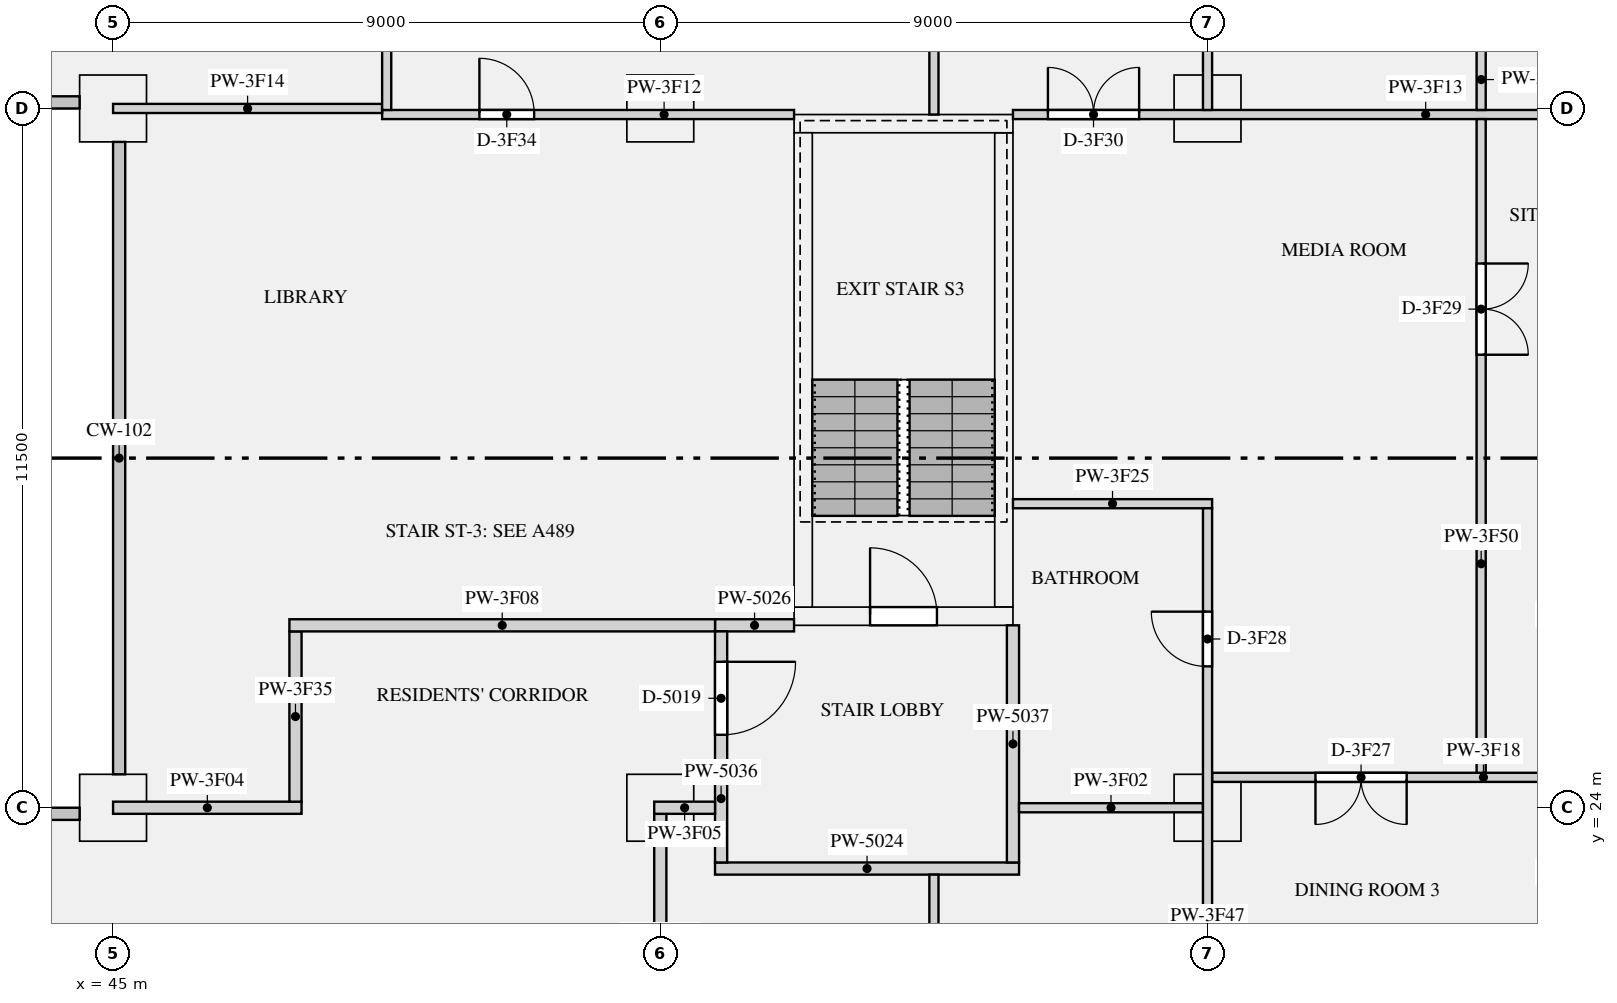
"""IFC4 building model, lengths in metres.
Left out: names, types, materials, properties, quantities, classifications, styles, units other than length and angle.
Written with IfcOpenShell. Run it as: python <this file> out.ifc"""

import sys

from ifc_helpers import new_model, si_unit, direction, frame, frame_2d, origin, origin_2d, place, context, subcontext, project, spatial, rectangle, extrude, element, fill, save


model = new_model("IFC4")
c1 = context("Model", 3, precision=1e-05, world=origin(), true_north=direction((0.0, 1.0)))
c2 = subcontext(c1, "Body", "Model", "MODEL_VIEW")
j1 = project(units=[si_unit("LENGTHUNIT", "METRE"), si_unit("PLANEANGLEUNIT", "RADIAN")], contexts=[c1])
p1 = place(None, origin())
s1 = spatial("IfcSite", under=j1, at=p1, CompositionType="ELEMENT")
p2 = place(p1, origin())
s2 = spatial("IfcBuilding", under=s1, at=p2, CompositionType="ELEMENT")
p3 = place(p2, frame((0.0, 0.0, 182.25)))
s3 = spatial("IfcBuildingStorey", under=s2, at=p3, CompositionType="ELEMENT", Elevation=182.25)
for number, where, z_axis, x_axis in (
    (1, (45.0, 24.0, 0.0), (0.0, 0.0, 1.0), (1.0, 0.0, 0.0)),
    (2, (54.0, 24.0, 0.0), (0.0, 0.0, 1.0), (1.0, 0.0, 0.0)),
    (3, (63.0, 24.0, 0.0), (0.0, 0.0, 1.0), (1.0, 0.0, 0.0)),
    (4, (45.0, 35.5, 0.0), (0.0, 0.0, 1.0), (1.0, 0.0, 0.0)),
    (5, (54.0, 35.5, 0.0), (0.0, 0.0, 1.0), (1.0, 0.0, 0.0)),
    (6, (63.0, 35.5, 0.0), (0.0, 0.0, 1.0), (1.0, 0.0, 0.0)),
):
    element("IfcColumn", number, at=place(p3, frame(where, z_axis=z_axis, x_axis=x_axis)), inside=s3, PredefinedType="COLUMN", context=c2, shape_type="SweptSolid", body=[
        extrude(rectangle(XDim=1.1, YDim=1.1, at=origin_2d()), origin(), (0.0, 0.0, 1.0), 3.15),
    ])
p4 = place(p3, frame((56.2, 27.15, 0.0), z_axis=(0.0, 0.0, 1.0), x_axis=(1.0, 0.0, 0.0)))
e7 = element("IfcWall", 7, at=p4, inside=s3, PredefinedType="SHEAR", context=c2, shape_type="SweptSolid", body=[
    extrude(rectangle(XDim=3.6, YDim=0.3, at=frame_2d((1.8, 0.0))), origin(), (0.0, 0.0, 1.0), 3.15),
])
p5 = place(p4, frame((1.25, 0.0, 0.0)))
e8 = element("IfcOpeningElement", 8, at=p5, cuts=e7, PredefinedType="OPENING", context=c2, shape_type="SweptSolid", body=[
    extrude(rectangle(XDim=1.1, YDim=2.1, at=frame_2d((0.55, 1.05))), frame((0.0, 0.16, 0.0), z_axis=(0.0, -1.0, 0.0), x_axis=(1.0, 0.0, 0.0)), (0.0, 0.0, 1.0), 0.32),
])
p6 = place(p3, frame((56.2, 35.25, 0.0), z_axis=(0.0, 0.0, 1.0), x_axis=(1.0, 0.0, 0.0)))
e9 = element("IfcWall", 9, at=p6, inside=s3, PredefinedType="SHEAR", context=c2, shape_type="SweptSolid", body=[
    extrude(rectangle(XDim=3.6, YDim=0.3, at=frame_2d((1.8, 0.0))), origin(), (0.0, 0.0, 1.0), 3.15),
])
for number, where, z_axis, x_axis in (
    (10, (56.35, 27.3, 0.0), (0.0, 0.0, 1.0), (0.0, 1.0, 0.0)),
    (11, (59.65, 27.3, 0.0), (0.0, 0.0, 1.0), (0.0, 1.0, 0.0)),
):
    element("IfcWall", number, at=place(p3, frame(where, z_axis=z_axis, x_axis=x_axis)), inside=s3, PredefinedType="SHEAR", context=c2, shape_type="SweptSolid", body=[
        extrude(rectangle(XDim=7.8, YDim=0.3, at=frame_2d((3.9, 0.0))), origin(), (0.0, 0.0, 1.0), 3.15),
    ])
p7 = place(p3, frame((54.9, 23.0, 0.0), z_axis=(0.0, 0.0, 1.0), x_axis=(1.0, 0.0, 0.0)))
e12 = element("IfcWall", 12, at=p7, inside=s3, PredefinedType="PARTITIONING", context=c2, shape_type="SweptSolid", body=[
    extrude(rectangle(XDim=5.0, YDim=0.2, at=frame_2d((2.5, 0.0))), origin(), (0.0, 0.0, 1.0), 2.65),
])
p8 = place(p3, frame((54.9, 27.0, 0.0), z_axis=(0.0, 0.0, 1.0), x_axis=(1.0, 0.0, 0.0)))
e13 = element("IfcWall", 13, at=p8, inside=s3, PredefinedType="PARTITIONING", context=c2, shape_type="SweptSolid", body=[
    extrude(rectangle(XDim=1.3, YDim=0.2, at=frame_2d((0.65, 0.0))), origin(), (0.0, 0.0, 1.0), 2.65),
])
p9 = place(p3, frame((55.0, 23.1, 0.0), z_axis=(0.0, 0.0, 1.0), x_axis=(0.0, 1.0, 0.0)))
e14 = element("IfcWall", 14, at=p9, inside=s3, PredefinedType="PARTITIONING", context=c2, shape_type="SweptSolid", body=[
    extrude(rectangle(XDim=3.8, YDim=0.2, at=frame_2d((1.9, 0.0))), origin(), (0.0, 0.0, 1.0), 2.65),
])
p10 = place(p9, frame((2.1, 0.0, 0.0)))
e15 = element("IfcOpeningElement", 15, at=p10, cuts=e14, PredefinedType="OPENING", context=c2, shape_type="SweptSolid", body=[
    extrude(rectangle(XDim=1.2, YDim=2.1, at=frame_2d((0.6, 1.05))), frame((0.0, 0.11, 0.0), z_axis=(0.0, -1.0, 0.0), x_axis=(1.0, 0.0, 0.0)), (0.0, 0.0, 1.0), 0.22),
])
p11 = place(p3, frame((59.8, 23.1, 0.0), z_axis=(0.0, 0.0, 1.0), x_axis=(0.0, 1.0, 0.0)))
e16 = element("IfcWall", 16, at=p11, inside=s3, PredefinedType="PARTITIONING", context=c2, shape_type="SweptSolid", body=[
    extrude(rectangle(XDim=3.9, YDim=0.2, at=frame_2d((1.95, 0.0))), origin(), (0.0, 0.0, 1.0), 2.65),
])
p12 = place(p3, frame((59.9, 24.0, 0.0), z_axis=(0.0, 0.0, 1.0), x_axis=(1.0, 0.0, 0.0)))
e17 = element("IfcWall", 17, at=p12, inside=s3, PredefinedType="PARTITIONING", context=c2, shape_type="SweptSolid", body=[
    extrude(rectangle(XDim=3.025, YDim=0.15, at=frame_2d((1.513, 0.0))), origin(), (0.0, 0.0, 1.0), 2.65),
])
p13 = place(p3, frame((45.0, 24.0, 0.0), z_axis=(0.0, 0.0, 1.0), x_axis=(1.0, 0.0, 0.0)))
e18 = element("IfcWall", 18, at=p13, inside=s3, PredefinedType="PARTITIONING", context=c2, shape_type="SweptSolid", body=[
    extrude(rectangle(XDim=3.1, YDim=0.2, at=frame_2d((1.55, 0.0))), origin(), (0.0, 0.0, 1.0), 2.65),
])
p14 = place(p3, frame((53.9, 24.0, 0.0), z_axis=(0.0, 0.0, 1.0), x_axis=(1.0, 0.0, 0.0)))
e19 = element("IfcWall", 19, at=p14, inside=s3, PredefinedType="PARTITIONING", context=c2, shape_type="SweptSolid", body=[
    extrude(rectangle(XDim=1.0, YDim=0.2, at=frame_2d((0.5, 0.0))), origin(), (0.0, 0.0, 1.0), 2.65),
])
p15 = place(p3, frame((47.9, 27.0, 0.0), z_axis=(0.0, 0.0, 1.0), x_axis=(1.0, 0.0, 0.0)))
e20 = element("IfcWall", 20, at=p15, inside=s3, PredefinedType="PARTITIONING", context=c2, shape_type="SweptSolid", body=[
    extrude(rectangle(XDim=7.0, YDim=0.2, at=frame_2d((3.5, 0.0))), origin(), (0.0, 0.0, 1.0), 2.65),
])
p16 = place(p3, frame((49.425, 35.4, 0.0), z_axis=(0.0, 0.0, 1.0), x_axis=(1.0, 0.0, 0.0)))
e21 = element("IfcWall", 21, at=p16, inside=s3, PredefinedType="PARTITIONING", context=c2, shape_type="SweptSolid", body=[
    extrude(rectangle(XDim=6.775, YDim=0.15, at=frame_2d((3.387, 0.0))), origin(), (0.0, 0.0, 1.0), 2.65),
])
p17 = place(p16, frame((1.6, 0.0, 0.0)))
e22 = element("IfcOpeningElement", 22, at=p17, cuts=e21, PredefinedType="OPENING", context=c2, shape_type="SweptSolid", body=[
    extrude(rectangle(XDim=0.9, YDim=2.1, at=frame_2d((0.45, 1.05))), frame((0.0, 0.085, 0.0), z_axis=(0.0, -1.0, 0.0), x_axis=(1.0, 0.0, 0.0)), (0.0, 0.0, 1.0), 0.17),
])
p18 = place(p3, frame((59.8, 35.4, 0.0), z_axis=(0.0, 0.0, 1.0), x_axis=(1.0, 0.0, 0.0)))
e23 = element("IfcWall", 23, at=p18, inside=s3, PredefinedType="PARTITIONING", context=c2, shape_type="SweptSolid", body=[
    extrude(rectangle(XDim=11.5, YDim=0.15, at=frame_2d((5.75, 0.0))), origin(), (0.0, 0.0, 1.0), 2.65),
])
p19 = place(p18, frame((0.575, 0.0, 0.0)))
e24 = element("IfcOpeningElement", 24, at=p19, cuts=e23, PredefinedType="OPENING", context=c2, shape_type="SweptSolid", body=[
    extrude(rectangle(XDim=1.5, YDim=2.1, at=frame_2d((0.75, 1.05))), frame((0.0, 0.085, 0.0), z_axis=(0.0, -1.0, 0.0), x_axis=(1.0, 0.0, 0.0)), (0.0, 0.0, 1.0), 0.17),
])
p20 = place(p3, frame((45.0, 35.5, 0.0), z_axis=(0.0, 0.0, 1.0), x_axis=(1.0, 0.0, 0.0)))
e25 = element("IfcWall", 25, at=p20, inside=s3, PredefinedType="PARTITIONING", context=c2, shape_type="SweptSolid", body=[
    extrude(rectangle(XDim=4.425, YDim=0.15, at=frame_2d((2.212, 0.0))), origin(), (0.0, 0.0, 1.0), 2.65),
])
p21 = place(p3, frame((63.075, 24.5, 0.0), z_axis=(0.0, 0.0, 1.0), x_axis=(1.0, 0.0, 0.0)))
e26 = element("IfcWall", 26, at=p21, inside=s3, PredefinedType="PARTITIONING", context=c2, shape_type="SweptSolid", body=[
    extrude(rectangle(XDim=5.725, YDim=0.15, at=frame_2d((2.863, 0.0))), origin(), (0.0, 0.0, 1.0), 2.65),
])
p22 = place(p21, frame((1.7, 0.0, 0.0)))
e27 = element("IfcOpeningElement", 27, at=p22, cuts=e26, PredefinedType="OPENING", context=c2, shape_type="SweptSolid", body=[
    extrude(rectangle(XDim=1.5, YDim=2.1, at=frame_2d((0.75, 1.05))), frame((0.0, 0.085, 0.0), z_axis=(0.0, -1.0, 0.0), x_axis=(1.0, 0.0, 0.0)), (0.0, 0.0, 1.0), 0.17),
])
p23 = place(p3, frame((59.8, 29.0, 0.0), z_axis=(0.0, 0.0, 1.0), x_axis=(1.0, 0.0, 0.0)))
e28 = element("IfcWall", 28, at=p23, inside=s3, PredefinedType="PARTITIONING", context=c2, shape_type="SweptSolid", body=[
    extrude(rectangle(XDim=3.275, YDim=0.15, at=frame_2d((1.637, 0.0))), origin(), (0.0, 0.0, 1.0), 2.65),
])
p24 = place(p3, frame((54.0, 16.1, 0.0), z_axis=(0.0, 0.0, 1.0), x_axis=(0.0, 1.0, 0.0)))
e29 = element("IfcWall", 29, at=p24, inside=s3, PredefinedType="PARTITIONING", context=c2, shape_type="SweptSolid", body=[
    extrude(rectangle(XDim=7.8, YDim=0.2, at=frame_2d((3.9, 0.0))), origin(), (0.0, 0.0, 1.0), 2.65),
])
p25 = place(p24, frame((1.85, 0.0, 0.0)))
e30 = element("IfcOpeningElement", 30, at=p25, cuts=e29, PredefinedType="OPENING", context=c2, shape_type="SweptSolid", body=[
    extrude(rectangle(XDim=1.1, YDim=2.1, at=frame_2d((0.55, 1.05))), frame((0.0, 0.11, 0.0), z_axis=(0.0, -1.0, 0.0), x_axis=(1.0, 0.0, 0.0)), (0.0, 0.0, 1.0), 0.22),
])
p26 = place(p3, frame((48.0, 24.1, 0.0), z_axis=(0.0, 0.0, 1.0), x_axis=(0.0, 1.0, 0.0)))
e31 = element("IfcWall", 31, at=p26, inside=s3, PredefinedType="PARTITIONING", context=c2, shape_type="SweptSolid", body=[
    extrude(rectangle(XDim=2.8, YDim=0.2, at=frame_2d((1.4, 0.0))), origin(), (0.0, 0.0, 1.0), 2.65),
])
p27 = place(p3, frame((58.5, 12.575, 0.0), z_axis=(0.0, 0.0, 1.0), x_axis=(0.0, 1.0, 0.0)))
e32 = element("IfcWall", 32, at=p27, inside=s3, PredefinedType="PARTITIONING", context=c2, shape_type="SweptSolid", body=[
    extrude(rectangle(XDim=10.325, YDim=0.15, at=frame_2d((5.163, 0.0))), origin(), (0.0, 0.0, 1.0), 2.65),
])
p28 = place(p27, frame((4.75, 0.0, 0.0)))
e33 = element("IfcOpeningElement", 33, at=p28, cuts=e32, PredefinedType="OPENING", context=c2, shape_type="SweptSolid", body=[
    extrude(rectangle(XDim=0.9, YDim=2.1, at=frame_2d((0.45, 1.05))), frame((0.0, 0.085, 0.0), z_axis=(0.0, -1.0, 0.0), x_axis=(1.0, 0.0, 0.0)), (0.0, 0.0, 1.0), 0.17),
])
p29 = place(p3, frame((58.5, 35.4, 0.0), z_axis=(0.0, 0.0, 1.0), x_axis=(0.0, 1.0, 0.0)))
e34 = element("IfcWall", 34, at=p29, inside=s3, PredefinedType="PARTITIONING", context=c2, shape_type="SweptSolid", body=[
    extrude(rectangle(XDim=7.4, YDim=0.15, at=frame_2d((3.7, 0.0))), origin(), (0.0, 0.0, 1.0), 2.65),
])
p30 = place(p29, frame((3.025, 0.0, 0.0)))
e35 = element("IfcOpeningElement", 35, at=p30, cuts=e34, PredefinedType="OPENING", context=c2, shape_type="SweptSolid", body=[
    extrude(rectangle(XDim=1.5, YDim=2.1, at=frame_2d((0.75, 1.05))), frame((0.0, 0.085, 0.0), z_axis=(0.0, -1.0, 0.0), x_axis=(1.0, 0.0, 0.0)), (0.0, 0.0, 1.0), 0.17),
])
p31 = place(p3, frame((63.0, 12.575, 0.0), z_axis=(0.0, 0.0, 1.0), x_axis=(0.0, 1.0, 0.0)))
e36 = element("IfcWall", 36, at=p31, inside=s3, PredefinedType="PARTITIONING", context=c2, shape_type="SweptSolid", body=[
    extrude(rectangle(XDim=16.35, YDim=0.15, at=frame_2d((8.175, 0.0))), origin(), (0.0, 0.0, 1.0), 2.65),
])
p32 = place(p31, frame((3.75, 0.0, 0.0)))
e37 = element("IfcOpeningElement", 37, at=p32, cuts=e36, PredefinedType="OPENING", context=c2, shape_type="SweptSolid", body=[
    extrude(rectangle(XDim=0.9, YDim=2.1, at=frame_2d((0.45, 1.05))), frame((0.0, 0.085, 0.0), z_axis=(0.0, -1.0, 0.0), x_axis=(1.0, 0.0, 0.0)), (0.0, 0.0, 1.0), 0.17),
])
p33 = place(p31, frame((13.75, 0.0, 0.0)))
e38 = element("IfcOpeningElement", 38, at=p33, cuts=e36, PredefinedType="OPENING", context=c2, shape_type="SweptSolid", body=[
    extrude(rectangle(XDim=0.9, YDim=2.1, at=frame_2d((0.45, 1.05))), frame((0.0, 0.085, 0.0), z_axis=(0.0, -1.0, 0.0), x_axis=(1.0, 0.0, 0.0)), (0.0, 0.0, 1.0), 0.17),
])
p34 = place(p3, frame((63.0, 35.475, 0.0), z_axis=(0.0, 0.0, 1.0), x_axis=(0.0, 1.0, 0.0)))
e39 = element("IfcWall", 39, at=p34, inside=s3, PredefinedType="PARTITIONING", context=c2, shape_type="SweptSolid", body=[
    extrude(rectangle(XDim=7.325, YDim=0.15, at=frame_2d((3.663, 0.0))), origin(), (0.0, 0.0, 1.0), 2.65),
])
p35 = place(p34, frame((3.575, 0.0, 0.0)))
e40 = element("IfcOpeningElement", 40, at=p35, cuts=e39, PredefinedType="OPENING", context=c2, shape_type="SweptSolid", body=[
    extrude(rectangle(XDim=0.9, YDim=2.1, at=frame_2d((0.45, 1.05))), frame((0.0, 0.085, 0.0), z_axis=(0.0, -1.0, 0.0), x_axis=(1.0, 0.0, 0.0)), (0.0, 0.0, 1.0), 0.17),
])
p36 = place(p3, frame((67.5, 24.575, 0.0), z_axis=(0.0, 0.0, 1.0), x_axis=(0.0, 1.0, 0.0)))
e41 = element("IfcWall", 41, at=p36, inside=s3, PredefinedType="PARTITIONING", context=c2, shape_type="SweptSolid", body=[
    extrude(rectangle(XDim=10.75, YDim=0.15, at=frame_2d((5.375, 0.0))), origin(), (0.0, 0.0, 1.0), 2.65),
])
p37 = place(p36, frame((6.875, 0.0, 0.0)))
e42 = element("IfcOpeningElement", 42, at=p37, cuts=e41, PredefinedType="OPENING", context=c2, shape_type="SweptSolid", body=[
    extrude(rectangle(XDim=1.5, YDim=2.1, at=frame_2d((0.75, 1.05))), frame((0.0, 0.085, 0.0), z_axis=(0.0, -1.0, 0.0), x_axis=(1.0, 0.0, 0.0)), (0.0, 0.0, 1.0), 0.17),
])
p38 = place(p3, frame((67.5, 35.475, 0.0), z_axis=(0.0, 0.0, 1.0), x_axis=(0.0, 1.0, 0.0)))
e43 = element("IfcWall", 43, at=p38, inside=s3, PredefinedType="PARTITIONING", context=c2, shape_type="SweptSolid", body=[
    extrude(rectangle(XDim=2.825, YDim=0.15, at=frame_2d((1.413, 0.0))), origin(), (0.0, 0.0, 1.0), 2.65),
])
p39 = place(p38, frame((1.0, 0.0, 0.0)))
e44 = element("IfcOpeningElement", 44, at=p39, cuts=e43, PredefinedType="OPENING", context=c2, shape_type="SweptSolid", body=[
    extrude(rectangle(XDim=0.9, YDim=2.1, at=frame_2d((0.45, 1.05))), frame((0.0, 0.085, 0.0), z_axis=(0.0, -1.0, 0.0), x_axis=(1.0, 0.0, 0.0)), (0.0, 0.0, 1.0), 0.17),
])
p40 = place(p3, frame((49.5, 35.475, 0.0), z_axis=(0.0, 0.0, 1.0), x_axis=(0.0, 1.0, 0.0)))
e45 = element("IfcWall", 45, at=p40, inside=s3, PredefinedType="PARTITIONING", context=c2, shape_type="SweptSolid", body=[
    extrude(rectangle(XDim=7.325, YDim=0.15, at=frame_2d((3.663, 0.0))), origin(), (0.0, 0.0, 1.0), 2.65),
])
p41 = place(p40, frame((3.0, 0.0, 0.0)))
e46 = element("IfcOpeningElement", 46, at=p41, cuts=e45, PredefinedType="OPENING", context=c2, shape_type="SweptSolid", body=[
    extrude(rectangle(XDim=1.5, YDim=2.1, at=frame_2d((0.75, 1.05))), frame((0.0, 0.085, 0.0), z_axis=(0.0, -1.0, 0.0), x_axis=(1.0, 0.0, 0.0)), (0.0, 0.0, 1.0), 0.17),
])
p42 = place(p5, origin())
e47 = element("IfcDoor", 47, at=p42, inside=s3, OperationType="SINGLE_SWING_LEFT", PredefinedType="DOOR", context=c2, shape_type="SweptSolid", body=[
    extrude(rectangle(XDim=1.1, YDim=2.1, at=frame_2d((0.55, 1.05))), frame((0.0, 0.025, 0.0), z_axis=(0.0, -1.0, 0.0), x_axis=(1.0, 0.0, 0.0)), (0.0, 0.0, 1.0), 0.05),
])
fill(e8, e47)
p43 = place(p10, frame((1.2, 0.0, 0.0), z_axis=(0.0, 0.0, 1.0), x_axis=(-1.0, 0.0, 0.0)))
e48 = element("IfcDoor", 48, at=p43, inside=s3, OperationType="SINGLE_SWING_LEFT", PredefinedType="DOOR", context=c2, shape_type="SweptSolid", body=[
    extrude(rectangle(XDim=1.2, YDim=2.1, at=frame_2d((0.6, 1.05))), frame((0.0, 0.025, 0.0), z_axis=(0.0, -1.0, 0.0), x_axis=(1.0, 0.0, 0.0)), (0.0, 0.0, 1.0), 0.05),
])
fill(e15, e48)
p44 = place(p22, frame((1.5, 0.0, 0.0), z_axis=(0.0, 0.0, 1.0), x_axis=(-1.0, 0.0, 0.0)))
e49 = element("IfcDoor", 49, at=p44, inside=s3, OperationType="DOUBLE_DOOR_SINGLE_SWING", PredefinedType="DOOR", context=c2, shape_type="SweptSolid", body=[
    extrude(rectangle(XDim=1.5, YDim=2.1, at=frame_2d((0.75, 1.05))), frame((0.0, 0.025, 0.0), z_axis=(0.0, -1.0, 0.0), x_axis=(1.0, 0.0, 0.0)), (0.0, 0.0, 1.0), 0.05),
])
fill(e27, e49)
p45 = place(p33, origin())
e50 = element("IfcDoor", 50, at=p45, inside=s3, OperationType="SINGLE_SWING_RIGHT", PredefinedType="DOOR", context=c2, shape_type="SweptSolid", body=[
    extrude(rectangle(XDim=0.9, YDim=2.1, at=frame_2d((0.45, 1.05))), frame((0.0, 0.025, 0.0), z_axis=(0.0, -1.0, 0.0), x_axis=(1.0, 0.0, 0.0)), (0.0, 0.0, 1.0), 0.05),
])
fill(e38, e50)
p46 = place(p37, frame((1.5, 0.0, 0.0), z_axis=(0.0, 0.0, 1.0), x_axis=(-1.0, 0.0, 0.0)))
e51 = element("IfcDoor", 51, at=p46, inside=s3, OperationType="DOUBLE_DOOR_SINGLE_SWING", PredefinedType="DOOR", context=c2, shape_type="SweptSolid", body=[
    extrude(rectangle(XDim=1.5, YDim=2.1, at=frame_2d((0.75, 1.05))), frame((0.0, 0.025, 0.0), z_axis=(0.0, -1.0, 0.0), x_axis=(1.0, 0.0, 0.0)), (0.0, 0.0, 1.0), 0.05),
])
fill(e42, e51)
p47 = place(p19, origin())
e52 = element("IfcDoor", 52, at=p47, inside=s3, OperationType="DOUBLE_DOOR_SINGLE_SWING", PredefinedType="DOOR", context=c2, shape_type="SweptSolid", body=[
    extrude(rectangle(XDim=1.5, YDim=2.1, at=frame_2d((0.75, 1.05))), frame((0.0, 0.025, 0.0), z_axis=(0.0, -1.0, 0.0), x_axis=(1.0, 0.0, 0.0)), (0.0, 0.0, 1.0), 0.05),
])
fill(e24, e52)
p48 = place(p17, origin())
e53 = element("IfcDoor", 53, at=p48, inside=s3, OperationType="SINGLE_SWING_LEFT", PredefinedType="DOOR", context=c2, shape_type="SweptSolid", body=[
    extrude(rectangle(XDim=0.9, YDim=2.1, at=frame_2d((0.45, 1.05))), frame((0.0, 0.025, 0.0), z_axis=(0.0, -1.0, 0.0), x_axis=(1.0, 0.0, 0.0)), (0.0, 0.0, 1.0), 0.05),
])
fill(e22, e53)
save(model, sys.argv[1])
